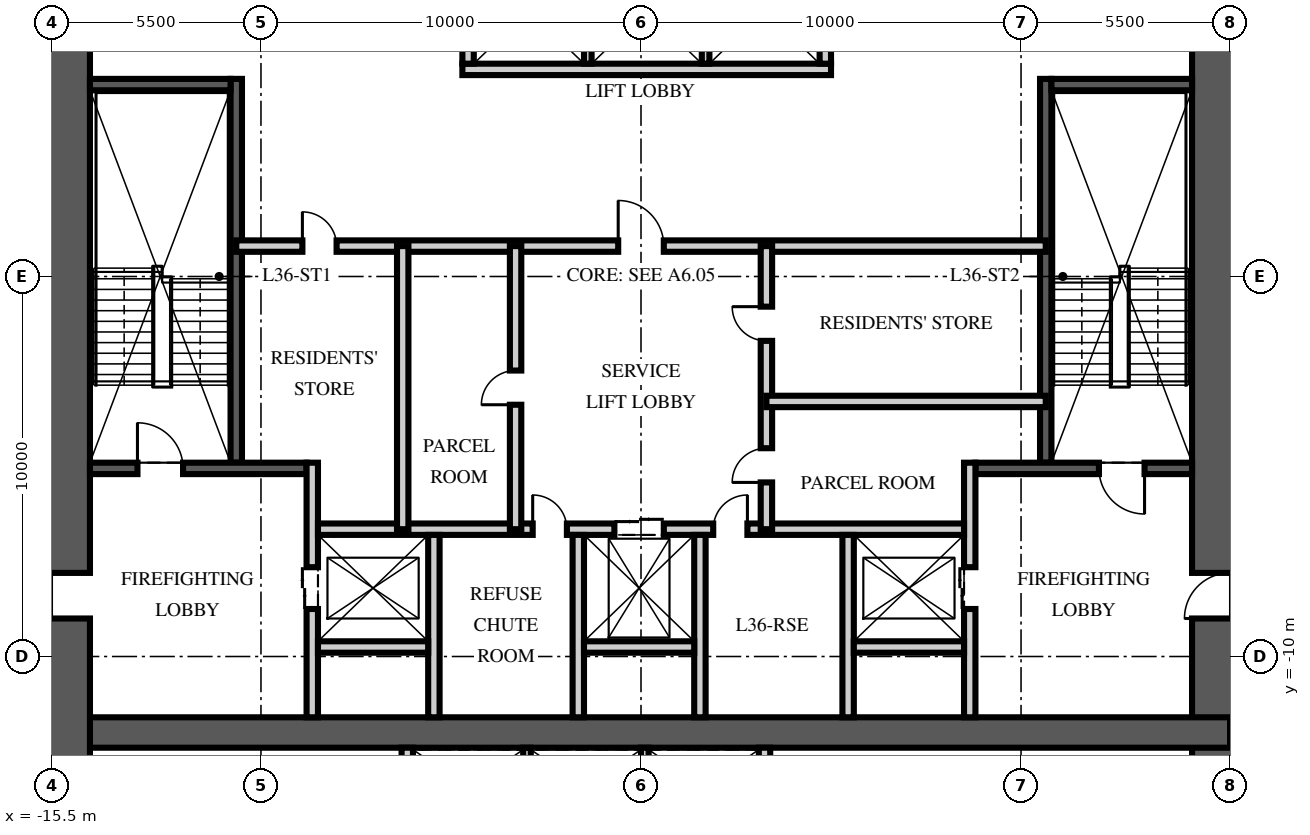
"""IFC4 building model, lengths in metres.
Left out: names, types, materials, properties, quantities, classifications, styles, units other than length and angle.
Written with IfcOpenShell. Run it as: python <this file> out.ifc"""

import sys

from ifc_helpers import new_model, si_unit, direction, frame, frame_2d, origin, place, context, subcontext, project, spatial, rectangle, extrude, element, fill, save


model = new_model("IFC4")
c1 = context("Model", 3, precision=1e-05, world=origin(), true_north=direction((0.0, 1.0)))
c2 = subcontext(c1, "Body", "Model", "MODEL_VIEW")
j1 = project(units=[si_unit("LENGTHUNIT", "METRE"), si_unit("PLANEANGLEUNIT", "RADIAN")], contexts=[c1])
p1 = place(None, origin())
s1 = spatial("IfcSite", under=j1, at=p1, CompositionType="ELEMENT")
p2 = place(p1, origin())
s2 = spatial("IfcBuilding", under=s1, at=p2, CompositionType="ELEMENT")
p3 = place(p2, frame((0.0, 0.0, 144.75)))
s3 = spatial("IfcBuildingStorey", under=s2, at=p3, CompositionType="ELEMENT", Elevation=144.75)
p4 = place(p3, frame((15.5, -15.5, -0.25), z_axis=(0.0, 0.0, 1.0), x_axis=(0.0, 1.0, 0.0)))
e1 = element("IfcWall", 1, at=p4, inside=s3, PredefinedType="SHEAR", context=c2, shape_type="SweptSolid", body=[
    extrude(rectangle(XDim=31.0, YDim=2.0, at=frame_2d((15.5, 0.0))), origin(), (0.0, 0.0, 1.0), 3.75),
])
p5 = place(p4, frame((6.5, 0.0, 0.25)))
e2 = element("IfcOpeningElement", 2, at=p5, cuts=e1, PredefinedType="OPENING", context=c2, shape_type="SweptSolid", body=[
    extrude(rectangle(XDim=1.2, YDim=2.1, at=frame_2d((0.6, 1.05))), frame((0.0, 1.01, 0.0), z_axis=(0.0, -1.0, 0.0), x_axis=(1.0, 0.0, 0.0)), (0.0, 0.0, 1.0), 2.02),
])
p6 = place(p4, frame((23.0, 0.0, 0.25)))
e3 = element("IfcOpeningElement", 3, at=p6, cuts=e1, PredefinedType="OPENING", context=c2, shape_type="SweptSolid", body=[
    extrude(rectangle(XDim=1.8, YDim=2.1, at=frame_2d((0.9, 1.05))), frame((0.0, 1.01, 0.0), z_axis=(0.0, -1.0, 0.0), x_axis=(1.0, 0.0, 0.0)), (0.0, 0.0, 1.0), 2.02),
])
p7 = place(p3, frame((-15.5, -12.0, -0.25), z_axis=(0.0, 0.0, 1.0), x_axis=(1.0, 0.0, 0.0)))
e4 = element("IfcWall", 4, at=p7, inside=s3, PredefinedType="SHEAR", context=c2, shape_type="SweptSolid", body=[
    extrude(rectangle(XDim=31.0, YDim=0.8, at=frame_2d((15.5, 0.0))), origin(), (0.0, 0.0, 1.0), 3.75),
])
p8 = place(p3, frame((-15.5, -15.5, -0.25), z_axis=(0.0, 0.0, 1.0), x_axis=(0.0, 1.0, 0.0)))
e5 = element("IfcWall", 5, at=p8, inside=s3, PredefinedType="SHEAR", context=c2, shape_type="SweptSolid", body=[
    extrude(rectangle(XDim=31.0, YDim=2.0, at=frame_2d((15.5, 0.0))), origin(), (0.0, 0.0, 1.0), 3.75),
])
p9 = place(p8, frame((6.5, 0.0, 0.25)))
e6 = element("IfcOpeningElement", 6, at=p9, cuts=e5, PredefinedType="OPENING", context=c2, shape_type="SweptSolid", body=[
    extrude(rectangle(XDim=1.2, YDim=2.1, at=frame_2d((0.6, 1.05))), frame((0.0, 1.01, 0.0), z_axis=(0.0, -1.0, 0.0), x_axis=(1.0, 0.0, 0.0)), (0.0, 0.0, 1.0), 2.02),
])
p10 = place(p8, frame((23.0, 0.0, 0.25)))
e7 = element("IfcOpeningElement", 7, at=p10, cuts=e5, PredefinedType="OPENING", context=c2, shape_type="SweptSolid", body=[
    extrude(rectangle(XDim=1.8, YDim=2.1, at=frame_2d((0.9, 1.05))), frame((0.0, 1.01, 0.0), z_axis=(0.0, -1.0, 0.0), x_axis=(1.0, 0.0, 0.0)), (0.0, 0.0, 1.0), 2.02),
])
p11 = place(p3, frame((-10.65, -4.9, 0.0), z_axis=(0.0, 0.0, 1.0), x_axis=(0.0, 1.0, 0.0)))
e8 = element("IfcWall", 8, at=p11, inside=s3, PredefinedType="SOLIDWALL", context=c2, shape_type="SweptSolid", body=[
    extrude(rectangle(XDim=10.1, YDim=0.3, at=frame_2d((5.05, 0.0))), origin(), (0.0, 0.0, 1.0), 3.5),
])
p12 = place(p3, frame((-14.5, -5.05, 0.0), z_axis=(0.0, 0.0, 1.0), x_axis=(1.0, 0.0, 0.0)))
e9 = element("IfcWall", 9, at=p12, inside=s3, PredefinedType="SOLIDWALL", context=c2, shape_type="SweptSolid", body=[
    extrude(rectangle(XDim=5.7, YDim=0.3, at=frame_2d((2.85, 0.0))), origin(), (0.0, 0.0, 1.0), 3.5),
])
p13 = place(p12, frame((1.25, 0.0, 0.0)))
e10 = element("IfcOpeningElement", 10, at=p13, cuts=e9, PredefinedType="OPENING", context=c2, shape_type="SweptSolid", body=[
    extrude(rectangle(XDim=1.2, YDim=2.1, at=frame_2d((0.6, 1.05))), frame((0.0, 0.16, 0.0), z_axis=(0.0, -1.0, 0.0), x_axis=(1.0, 0.0, 0.0)), (0.0, 0.0, 1.0), 0.32),
])
p14 = place(p3, frame((-14.5, 5.05, 0.0), z_axis=(0.0, 0.0, 1.0), x_axis=(1.0, 0.0, 0.0)))
e11 = element("IfcWall", 11, at=p14, inside=s3, PredefinedType="SOLIDWALL", context=c2, shape_type="SweptSolid", body=[
    extrude(rectangle(XDim=3.7, YDim=0.3, at=frame_2d((1.85, 0.0))), origin(), (0.0, 0.0, 1.0), 3.5),
])
p15 = place(p3, frame((-8.65, -11.6, 0.0), z_axis=(0.0, 0.0, 1.0), x_axis=(0.0, 1.0, 0.0)))
e12 = element("IfcWall", 12, at=p15, inside=s3, PredefinedType="PARTITIONING", context=c2, shape_type="SweptSolid", body=[
    extrude(rectangle(XDim=6.7, YDim=0.3, at=frame_2d((3.35, 0.0))), origin(), (0.0, 0.0, 1.0), 3.5),
])
p16 = place(p15, frame((2.85, 0.0, 0.0)))
e13 = element("IfcOpeningElement", 13, at=p16, cuts=e12, PredefinedType="OPENING", context=c2, shape_type="SweptSolid", body=[
    extrude(rectangle(XDim=1.1, YDim=2.1, at=frame_2d((0.55, 1.05))), frame((0.0, 0.16, 0.0), z_axis=(0.0, -1.0, 0.0), x_axis=(1.0, 0.0, 0.0)), (0.0, 0.0, 1.0), 0.32),
])
p17 = place(p3, frame((10.65, -4.9, 0.0), z_axis=(0.0, 0.0, 1.0), x_axis=(0.0, 1.0, 0.0)))
e14 = element("IfcWall", 14, at=p17, inside=s3, PredefinedType="SOLIDWALL", context=c2, shape_type="SweptSolid", body=[
    extrude(rectangle(XDim=10.1, YDim=0.3, at=frame_2d((5.05, 0.0))), origin(), (0.0, 0.0, 1.0), 3.5),
])
p18 = place(p3, frame((14.5, -5.05, 0.0), z_axis=(0.0, 0.0, 1.0), x_axis=(-1.0, 0.0, 0.0)))
e15 = element("IfcWall", 15, at=p18, inside=s3, PredefinedType="SOLIDWALL", context=c2, shape_type="SweptSolid", body=[
    extrude(rectangle(XDim=5.7, YDim=0.3, at=frame_2d((2.85, 0.0))), origin(), (0.0, 0.0, 1.0), 3.5),
])
p19 = place(p18, frame((1.25, 0.0, 0.0)))
e16 = element("IfcOpeningElement", 16, at=p19, cuts=e15, PredefinedType="OPENING", context=c2, shape_type="SweptSolid", body=[
    extrude(rectangle(XDim=1.2, YDim=2.1, at=frame_2d((0.6, 1.05))), frame((0.0, 0.16, 0.0), z_axis=(0.0, -1.0, 0.0), x_axis=(1.0, 0.0, 0.0)), (0.0, 0.0, 1.0), 0.32),
])
p20 = place(p3, frame((14.5, 5.05, 0.0), z_axis=(0.0, 0.0, 1.0), x_axis=(-1.0, 0.0, 0.0)))
e17 = element("IfcWall", 17, at=p20, inside=s3, PredefinedType="SOLIDWALL", context=c2, shape_type="SweptSolid", body=[
    extrude(rectangle(XDim=3.7, YDim=0.3, at=frame_2d((1.85, 0.0))), origin(), (0.0, 0.0, 1.0), 3.5),
])
p21 = place(p3, frame((8.65, -11.6, 0.0), z_axis=(0.0, 0.0, 1.0), x_axis=(0.0, 1.0, 0.0)))
e18 = element("IfcWall", 18, at=p21, inside=s3, PredefinedType="PARTITIONING", context=c2, shape_type="SweptSolid", body=[
    extrude(rectangle(XDim=6.7, YDim=0.3, at=frame_2d((3.35, 0.0))), origin(), (0.0, 0.0, 1.0), 3.5),
])
p22 = place(p21, frame((2.85, 0.0, 0.0)))
e19 = element("IfcOpeningElement", 19, at=p22, cuts=e18, PredefinedType="OPENING", context=c2, shape_type="SweptSolid", body=[
    extrude(rectangle(XDim=1.1, YDim=2.1, at=frame_2d((0.55, 1.05))), frame((0.0, 0.16, 0.0), z_axis=(0.0, -1.0, 0.0), x_axis=(1.0, 0.0, 0.0)), (0.0, 0.0, 1.0), 0.32),
])
p23 = place(p3, frame((-8.5, -6.65, 0.0), z_axis=(0.0, 0.0, 1.0), x_axis=(1.0, 0.0, 0.0)))
e20 = element("IfcWall", 20, at=p23, inside=s3, PredefinedType="PARTITIONING", context=c2, shape_type="SweptSolid", body=[
    extrude(rectangle(XDim=17.0, YDim=0.3, at=frame_2d((8.5, 0.0))), origin(), (0.0, 0.0, 1.0), 3.5),
])
p24 = place(p23, frame((7.8, 0.0, 0.0)))
e21 = element("IfcOpeningElement", 21, at=p24, cuts=e20, PredefinedType="OPENING", context=c2, shape_type="SweptSolid", body=[
    extrude(rectangle(XDim=1.3, YDim=2.4, at=frame_2d((0.65, 1.2))), frame((0.0, 0.16, 0.0), z_axis=(0.0, -1.0, 0.0), x_axis=(1.0, 0.0, 0.0)), (0.0, 0.0, 1.0), 0.32),
])
p25 = place(p23, frame((5.65, 0.0, 0.0)))
e22 = element("IfcOpeningElement", 22, at=p25, cuts=e20, PredefinedType="OPENING", context=c2, shape_type="SweptSolid", body=[
    extrude(rectangle(XDim=0.9, YDim=2.1, at=frame_2d((0.45, 1.05))), frame((0.0, 0.16, 0.0), z_axis=(0.0, -1.0, 0.0), x_axis=(1.0, 0.0, 0.0)), (0.0, 0.0, 1.0), 0.32),
])
p26 = place(p23, frame((10.4, 0.0, 0.0)))
e23 = element("IfcOpeningElement", 23, at=p26, cuts=e20, PredefinedType="OPENING", context=c2, shape_type="SweptSolid", body=[
    extrude(rectangle(XDim=0.9, YDim=2.1, at=frame_2d((0.45, 1.05))), frame((0.0, 0.16, 0.0), z_axis=(0.0, -1.0, 0.0), x_axis=(1.0, 0.0, 0.0)), (0.0, 0.0, 1.0), 0.32),
])
for number, where, z_axis, x_axis in (
    (24, (-5.45, -11.6, 0.0), (0.0, 0.0, 1.0), (0.0, 1.0, 0.0)),
    (25, (-1.65, -11.6, 0.0), (0.0, 0.0, 1.0), (0.0, 1.0, 0.0)),
    (26, (1.55, -11.6, 0.0), (0.0, 0.0, 1.0), (0.0, 1.0, 0.0)),
    (27, (5.45, -11.6, 0.0), (0.0, 0.0, 1.0), (0.0, 1.0, 0.0)),
):
    element("IfcWall", number, at=place(p3, frame(where, z_axis=z_axis, x_axis=x_axis)), inside=s3, PredefinedType="PARTITIONING", context=c2, shape_type="SweptSolid", body=[
        extrude(rectangle(XDim=4.8, YDim=0.3, at=frame_2d((2.4, 0.0))), origin(), (0.0, 0.0, 1.0), 3.5),
    ])
for number, where, z_axis, x_axis in (
    (28, (-8.5, -9.75, 0.0), (0.0, 0.0, 1.0), (1.0, 0.0, 0.0)),
    (29, (-1.5, -9.75, 0.0), (0.0, 0.0, 1.0), (1.0, 0.0, 0.0)),
    (30, (5.6, -9.75, 0.0), (0.0, 0.0, 1.0), (1.0, 0.0, 0.0)),
):
    element("IfcWall", number, at=place(p3, frame(where, z_axis=z_axis, x_axis=x_axis)), inside=s3, PredefinedType="PARTITIONING", context=c2, shape_type="SweptSolid", body=[
        extrude(rectangle(XDim=2.9, YDim=0.3, at=frame_2d((1.45, 0.0))), origin(), (0.0, 0.0, 1.0), 3.5),
    ])
p27 = place(p3, frame((-4.7, 5.45, 0.0), z_axis=(0.0, 0.0, 1.0), x_axis=(1.0, 0.0, 0.0)))
e31 = element("IfcWall", 31, at=p27, inside=s3, PredefinedType="PARTITIONING", context=c2, shape_type="SweptSolid", body=[
    extrude(rectangle(XDim=9.7, YDim=0.3, at=frame_2d((4.85, 0.0))), origin(), (0.0, 0.0, 1.0), 3.5),
])
for number, where, z_axis, x_axis in (
    (32, (-4.55, 5.6, 0.0), (0.0, 0.0, 1.0), (0.0, 1.0, 0.0)),
    (33, (4.85, 5.6, 0.0), (0.0, 0.0, 1.0), (0.0, 1.0, 0.0)),
):
    element("IfcWall", number, at=place(p3, frame(where, z_axis=z_axis, x_axis=x_axis)), inside=s3, PredefinedType="PARTITIONING", context=c2, shape_type="SweptSolid", body=[
        extrude(rectangle(XDim=2.8, YDim=0.3, at=frame_2d((1.4, 0.0))), origin(), (0.0, 0.0, 1.0), 3.5),
    ])
for number, where, z_axis, x_axis in (
    (34, (-1.4, 5.6, 0.0), (0.0, 0.0, 1.0), (0.0, 1.0, 0.0)),
    (35, (1.7, 5.6, 0.0), (0.0, 0.0, 1.0), (0.0, 1.0, 0.0)),
):
    element("IfcWall", number, at=place(p3, frame(where, z_axis=z_axis, x_axis=x_axis)), inside=s3, PredefinedType="PARTITIONING", context=c2, shape_type="SweptSolid", body=[
        extrude(rectangle(XDim=2.8, YDim=0.2, at=frame_2d((1.4, 0.0))), origin(), (0.0, 0.0, 1.0), 3.5),
    ])
for number, where, z_axis, x_axis in (
    (36, (-6.15, -14.5, 0.0), (0.0, 0.0, 1.0), (0.0, 1.0, 0.0)),
    (37, (3.25, -14.5, 0.0), (0.0, 0.0, 1.0), (0.0, 1.0, 0.0)),
):
    element("IfcWall", number, at=place(p3, frame(where, z_axis=z_axis, x_axis=x_axis)), inside=s3, PredefinedType="PARTITIONING", context=c2, shape_type="SweptSolid", body=[
        extrude(rectangle(XDim=2.1, YDim=0.3, at=frame_2d((1.05, 0.0))), origin(), (0.0, 0.0, 1.0), 3.5),
    ])
for number, where, z_axis, x_axis in (
    (38, (-3.0, -14.5, 0.0), (0.0, 0.0, 1.0), (0.0, 1.0, 0.0)),
    (39, (0.1, -14.5, 0.0), (0.0, 0.0, 1.0), (0.0, 1.0, 0.0)),
):
    element("IfcWall", number, at=place(p3, frame(where, z_axis=z_axis, x_axis=x_axis)), inside=s3, PredefinedType="PARTITIONING", context=c2, shape_type="SweptSolid", body=[
        extrude(rectangle(XDim=2.1, YDim=0.2, at=frame_2d((1.05, 0.0))), origin(), (0.0, 0.0, 1.0), 3.5),
    ])
p28 = place(p3, frame((-10.65, 0.8, 0.0), z_axis=(0.0, 0.0, 1.0), x_axis=(1.0, 0.0, 0.0)))
e40 = element("IfcWall", 40, at=p28, inside=s3, PredefinedType="PARTITIONING", context=c2, shape_type="SweptSolid", body=[
    extrude(rectangle(XDim=21.3, YDim=0.3, at=frame_2d((10.65, 0.0))), origin(), (0.0, 0.0, 1.0), 3.5),
])
p29 = place(p28, frame((10.05, 0.0, 0.0)))
e41 = element("IfcOpeningElement", 41, at=p29, cuts=e40, PredefinedType="OPENING", context=c2, shape_type="SweptSolid", body=[
    extrude(rectangle(XDim=1.2, YDim=2.1, at=frame_2d((0.6, 1.05))), frame((0.0, 0.16, 0.0), z_axis=(0.0, -1.0, 0.0), x_axis=(1.0, 0.0, 0.0)), (0.0, 0.0, 1.0), 0.32),
])
p30 = place(p28, frame((1.74, 0.0, 0.0)))
e42 = element("IfcOpeningElement", 42, at=p30, cuts=e40, PredefinedType="OPENING", context=c2, shape_type="SweptSolid", body=[
    extrude(rectangle(XDim=0.9, YDim=2.1, at=frame_2d((0.45, 1.05))), frame((0.0, 0.16, 0.0), z_axis=(0.0, -1.0, 0.0), x_axis=(1.0, 0.0, 0.0)), (0.0, 0.0, 1.0), 0.32),
])
p31 = place(p3, frame((-3.3, -6.65, 0.0), z_axis=(0.0, 0.0, 1.0), x_axis=(0.0, 1.0, 0.0)))
e43 = element("IfcWall", 43, at=p31, inside=s3, PredefinedType="PARTITIONING", context=c2, shape_type="SweptSolid", body=[
    extrude(rectangle(XDim=7.45, YDim=0.3, at=frame_2d((3.725, 0.0))), origin(), (0.0, 0.0, 1.0), 3.5),
])
p32 = place(p31, frame((3.275, 0.0, 0.0)))
e44 = element("IfcOpeningElement", 44, at=p32, cuts=e43, PredefinedType="OPENING", context=c2, shape_type="SweptSolid", body=[
    extrude(rectangle(XDim=0.9, YDim=2.1, at=frame_2d((0.45, 1.05))), frame((0.0, 0.16, 0.0), z_axis=(0.0, -1.0, 0.0), x_axis=(1.0, 0.0, 0.0)), (0.0, 0.0, 1.0), 0.32),
])
p33 = place(p3, frame((3.3, -6.65, 0.0), z_axis=(0.0, 0.0, 1.0), x_axis=(0.0, 1.0, 0.0)))
e45 = element("IfcWall", 45, at=p33, inside=s3, PredefinedType="PARTITIONING", context=c2, shape_type="SweptSolid", body=[
    extrude(rectangle(XDim=7.45, YDim=0.3, at=frame_2d((3.725, 0.0))), origin(), (0.0, 0.0, 1.0), 3.5),
])
p34 = place(p33, frame((1.231, 0.0, 0.0)))
e46 = element("IfcOpeningElement", 46, at=p34, cuts=e45, PredefinedType="OPENING", context=c2, shape_type="SweptSolid", body=[
    extrude(rectangle(XDim=0.9, YDim=2.1, at=frame_2d((0.45, 1.05))), frame((0.0, 0.16, 0.0), z_axis=(0.0, -1.0, 0.0), x_axis=(1.0, 0.0, 0.0)), (0.0, 0.0, 1.0), 0.32),
])
p35 = place(p33, frame((4.956, 0.0, 0.0)))
e47 = element("IfcOpeningElement", 47, at=p35, cuts=e45, PredefinedType="OPENING", context=c2, shape_type="SweptSolid", body=[
    extrude(rectangle(XDim=0.9, YDim=2.1, at=frame_2d((0.45, 1.05))), frame((0.0, 0.16, 0.0), z_axis=(0.0, -1.0, 0.0), x_axis=(1.0, 0.0, 0.0)), (0.0, 0.0, 1.0), 0.32),
])
p36 = place(p3, frame((-6.27, -6.65, 0.0), z_axis=(0.0, 0.0, 1.0), x_axis=(0.0, 1.0, 0.0)))
e48 = element("IfcWall", 48, at=p36, inside=s3, PredefinedType="PARTITIONING", context=c2, shape_type="SweptSolid", body=[
    extrude(rectangle(XDim=7.45, YDim=0.3, at=frame_2d((3.725, 0.0))), origin(), (0.0, 0.0, 1.0), 3.5),
])
p37 = place(p3, frame((10.65, -3.288, 0.0), z_axis=(0.0, 0.0, 1.0), x_axis=(-1.0, 0.0, 0.0)))
e49 = element("IfcWall", 49, at=p37, inside=s3, PredefinedType="PARTITIONING", context=c2, shape_type="SweptSolid", body=[
    extrude(rectangle(XDim=7.35, YDim=0.3, at=frame_2d((3.675, 0.0))), origin(), (0.0, 0.0, 1.0), 3.5),
])
p38 = place(p13, origin())
e50 = element("IfcDoor", 50, at=p38, inside=s3, OperationType="SINGLE_SWING_LEFT", PredefinedType="DOOR", context=c2, shape_type="SweptSolid", body=[
    extrude(rectangle(XDim=1.2, YDim=2.1, at=frame_2d((0.6, 1.05))), frame((0.0, 0.025, 0.0), z_axis=(0.0, -1.0, 0.0), x_axis=(1.0, 0.0, 0.0)), (0.0, 0.0, 1.0), 0.05),
])
fill(e10, e50)
p39 = place(p9, origin())
e51 = element("IfcDoor", 51, at=p39, inside=s3, OperationType="SINGLE_SWING_LEFT", PredefinedType="DOOR", context=c2, shape_type="SweptSolid", body=[
    extrude(rectangle(XDim=1.2, YDim=2.1, at=frame_2d((0.6, 1.05))), frame((0.0, 0.025, 0.0), z_axis=(0.0, -1.0, 0.0), x_axis=(1.0, 0.0, 0.0)), (0.0, 0.0, 1.0), 0.05),
])
fill(e6, e51)
p40 = place(p19, origin())
e52 = element("IfcDoor", 52, at=p40, inside=s3, OperationType="SINGLE_SWING_LEFT", PredefinedType="DOOR", context=c2, shape_type="SweptSolid", body=[
    extrude(rectangle(XDim=1.2, YDim=2.1, at=frame_2d((0.6, 1.05))), frame((0.0, 0.025, 0.0), z_axis=(0.0, -1.0, 0.0), x_axis=(1.0, 0.0, 0.0)), (0.0, 0.0, 1.0), 0.05),
])
fill(e16, e52)
p41 = place(p5, origin())
e53 = element("IfcDoor", 53, at=p41, inside=s3, OperationType="SINGLE_SWING_LEFT", PredefinedType="DOOR", context=c2, shape_type="SweptSolid", body=[
    extrude(rectangle(XDim=1.2, YDim=2.1, at=frame_2d((0.6, 1.05))), frame((0.0, 0.025, 0.0), z_axis=(0.0, -1.0, 0.0), x_axis=(1.0, 0.0, 0.0)), (0.0, 0.0, 1.0), 0.05),
])
fill(e2, e53)
p42 = place(p16, origin())
e54 = element("IfcDoor", 54, at=p42, inside=s3, OperationType="DOUBLE_DOOR_SLIDING", PredefinedType="DOOR", context=c2, shape_type="SweptSolid", body=[
    extrude(rectangle(XDim=1.1, YDim=2.1, at=frame_2d((0.55, 1.05))), frame((0.0, 0.025, 0.0), z_axis=(0.0, -1.0, 0.0), x_axis=(1.0, 0.0, 0.0)), (0.0, 0.0, 1.0), 0.05),
])
fill(e13, e54)
p43 = place(p22, origin())
e55 = element("IfcDoor", 55, at=p43, inside=s3, OperationType="DOUBLE_DOOR_SLIDING", PredefinedType="DOOR", context=c2, shape_type="SweptSolid", body=[
    extrude(rectangle(XDim=1.1, YDim=2.1, at=frame_2d((0.55, 1.05))), frame((0.0, 0.025, 0.0), z_axis=(0.0, -1.0, 0.0), x_axis=(1.0, 0.0, 0.0)), (0.0, 0.0, 1.0), 0.05),
])
fill(e19, e55)
p44 = place(p24, origin())
e56 = element("IfcDoor", 56, at=p44, inside=s3, OperationType="DOUBLE_DOOR_SLIDING", PredefinedType="DOOR", context=c2, shape_type="SweptSolid", body=[
    extrude(rectangle(XDim=1.3, YDim=2.4, at=frame_2d((0.65, 1.2))), frame((0.0, 0.025, 0.0), z_axis=(0.0, -1.0, 0.0), x_axis=(1.0, 0.0, 0.0)), (0.0, 0.0, 1.0), 0.05),
])
fill(e21, e56)
p45 = place(p29, origin())
e57 = element("IfcDoor", 57, at=p45, inside=s3, OperationType="SINGLE_SWING_LEFT", PredefinedType="DOOR", context=c2, shape_type="SweptSolid", body=[
    extrude(rectangle(XDim=1.2, YDim=2.1, at=frame_2d((0.6, 1.05))), frame((0.0, 0.025, 0.0), z_axis=(0.0, -1.0, 0.0), x_axis=(1.0, 0.0, 0.0)), (0.0, 0.0, 1.0), 0.05),
])
fill(e41, e57)
p46 = place(p25, origin())
e58 = element("IfcDoor", 58, at=p46, inside=s3, OperationType="SINGLE_SWING_LEFT", PredefinedType="DOOR", context=c2, shape_type="SweptSolid", body=[
    extrude(rectangle(XDim=0.9, YDim=2.1, at=frame_2d((0.45, 1.05))), frame((0.0, 0.025, 0.0), z_axis=(0.0, -1.0, 0.0), x_axis=(1.0, 0.0, 0.0)), (0.0, 0.0, 1.0), 0.05),
])
fill(e22, e58)
p47 = place(p26, origin())
e59 = element("IfcDoor", 59, at=p47, inside=s3, OperationType="SINGLE_SWING_RIGHT", PredefinedType="DOOR", context=c2, shape_type="SweptSolid", body=[
    extrude(rectangle(XDim=0.9, YDim=2.1, at=frame_2d((0.45, 1.05))), frame((0.0, 0.025, 0.0), z_axis=(0.0, -1.0, 0.0), x_axis=(1.0, 0.0, 0.0)), (0.0, 0.0, 1.0), 0.05),
])
fill(e23, e59)
p48 = place(p32, origin())
e60 = element("IfcDoor", 60, at=p48, inside=s3, OperationType="SINGLE_SWING_LEFT", PredefinedType="DOOR", context=c2, shape_type="SweptSolid", body=[
    extrude(rectangle(XDim=0.9, YDim=2.1, at=frame_2d((0.45, 1.05))), frame((0.0, 0.025, 0.0), z_axis=(0.0, -1.0, 0.0), x_axis=(1.0, 0.0, 0.0)), (0.0, 0.0, 1.0), 0.05),
])
fill(e44, e60)
p49 = place(p30, origin())
e61 = element("IfcDoor", 61, at=p49, inside=s3, OperationType="SINGLE_SWING_LEFT", PredefinedType="DOOR", context=c2, shape_type="SweptSolid", body=[
    extrude(rectangle(XDim=0.9, YDim=2.1, at=frame_2d((0.45, 1.05))), frame((0.0, 0.025, 0.0), z_axis=(0.0, -1.0, 0.0), x_axis=(1.0, 0.0, 0.0)), (0.0, 0.0, 1.0), 0.05),
])
fill(e42, e61)
p50 = place(p34, origin())
e62 = element("IfcDoor", 62, at=p50, inside=s3, OperationType="SINGLE_SWING_LEFT", PredefinedType="DOOR", context=c2, shape_type="SweptSolid", body=[
    extrude(rectangle(XDim=0.9, YDim=2.1, at=frame_2d((0.45, 1.05))), frame((0.0, 0.025, 0.0), z_axis=(0.0, -1.0, 0.0), x_axis=(1.0, 0.0, 0.0)), (0.0, 0.0, 1.0), 0.05),
])
fill(e46, e62)
p51 = place(p35, origin())
e63 = element("IfcDoor", 63, at=p51, inside=s3, OperationType="SINGLE_SWING_RIGHT", PredefinedType="DOOR", context=c2, shape_type="SweptSolid", body=[
    extrude(rectangle(XDim=0.9, YDim=2.1, at=frame_2d((0.45, 1.05))), frame((0.0, 0.025, 0.0), z_axis=(0.0, -1.0, 0.0), x_axis=(1.0, 0.0, 0.0)), (0.0, 0.0, 1.0), 0.05),
])
fill(e47, e63)
save(model, sys.argv[1])
